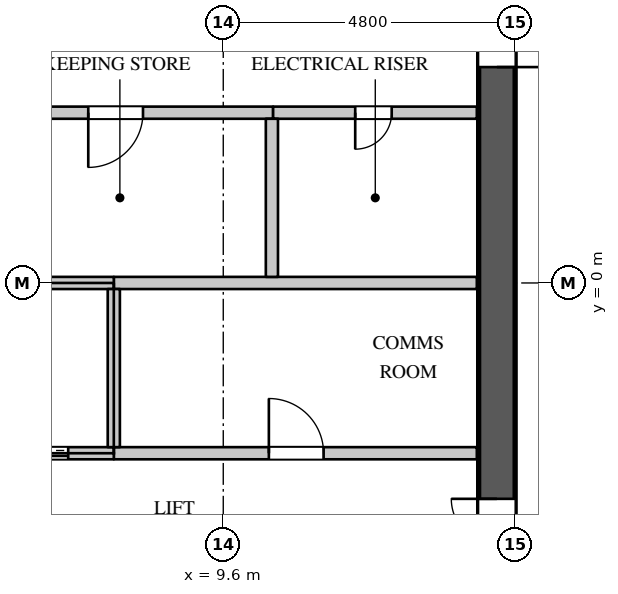
"""IFC4 building model, lengths in metres.
Left out: names, types, materials, properties, quantities, classifications, styles, units other than length and angle.
Written with IfcOpenShell. Run it as: python <this file> out.ifc"""

import sys

from ifc_helpers import new_model, si_unit, direction, frame, frame_2d, origin, place, context, subcontext, project, spatial, rectangle, extrude, element, fill, save


model = new_model("IFC4")
c1 = context("Model", 3, precision=1e-05, world=origin(), true_north=direction((0.0, 1.0)))
c2 = subcontext(c1, "Body", "Model", "MODEL_VIEW")
j1 = project(units=[si_unit("LENGTHUNIT", "METRE"), si_unit("PLANEANGLEUNIT", "RADIAN")], contexts=[c1])
p1 = place(None, origin())
s1 = spatial("IfcSite", under=j1, at=p1, CompositionType="ELEMENT")
p2 = place(p1, origin())
s2 = spatial("IfcBuilding", under=s1, at=p2, CompositionType="ELEMENT")
p3 = place(p2, frame((0.0, 0.0, 218.1)))
s3 = spatial("IfcBuildingStorey", under=s2, at=p3, CompositionType="ELEMENT", Elevation=218.1)
p4 = place(p3, frame((14.1, -11.4, 0.0), z_axis=(0.0, 0.0, 1.0), x_axis=(0.0, 1.0, 0.0)))
e1 = element("IfcWall", 1, at=p4, inside=s3, PredefinedType="SHEAR", context=c2, shape_type="SweptSolid", body=[
    extrude(rectangle(XDim=22.8, YDim=0.6, at=frame_2d((11.4, 0.0))), origin(), (0.0, 0.0, 1.0), 4.2),
])
p5 = place(p4, frame((20.45, 0.0, 0.0)))
e2 = element("IfcOpeningElement", 2, at=p5, cuts=e1, PredefinedType="OPENING", context=c2, shape_type="SweptSolid", body=[
    extrude(rectangle(XDim=1.1, YDim=2.2, at=frame_2d((0.55, 1.1))), frame((0.0, 0.31, 0.0), z_axis=(0.0, -1.0, 0.0), x_axis=(1.0, 0.0, 0.0)), (0.0, 0.0, 1.0), 0.62),
])
p6 = place(p4, frame((1.25, 0.0, 0.0)))
e3 = element("IfcOpeningElement", 3, at=p6, cuts=e1, PredefinedType="OPENING", context=c2, shape_type="SweptSolid", body=[
    extrude(rectangle(XDim=1.1, YDim=2.2, at=frame_2d((0.55, 1.1))), frame((0.0, 0.31, 0.0), z_axis=(0.0, -1.0, 0.0), x_axis=(1.0, 0.0, 0.0)), (0.0, 0.0, 1.0), 0.62),
])
p7 = place(p4, frame((14.95, 0.0, 0.0)))
e4 = element("IfcOpeningElement", 4, at=p7, cuts=e1, PredefinedType="OPENING", context=c2, shape_type="SweptSolid", body=[
    extrude(rectangle(XDim=1.5, YDim=2.4, at=frame_2d((0.75, 1.2))), frame((0.0, 0.31, 0.0), z_axis=(0.0, -1.0, 0.0), x_axis=(1.0, 0.0, 0.0)), (0.0, 0.0, 1.0), 0.62),
])
p8 = place(p4, frame((6.35, 0.0, 0.0)))
e5 = element("IfcOpeningElement", 5, at=p8, cuts=e1, PredefinedType="OPENING", context=c2, shape_type="SweptSolid", body=[
    extrude(rectangle(XDim=1.5, YDim=2.4, at=frame_2d((0.75, 1.2))), frame((0.0, 0.31, 0.0), z_axis=(0.0, -1.0, 0.0), x_axis=(1.0, 0.0, 0.0)), (0.0, 0.0, 1.0), 0.62),
])
p9 = place(p3, frame((1.38, 2.8, 0.0), z_axis=(0.0, 0.0, 1.0), x_axis=(1.0, 0.0, 0.0)))
e6 = element("IfcWall", 6, at=p9, inside=s3, PredefinedType="PARTITIONING", context=c2, shape_type="SweptSolid", body=[
    extrude(rectangle(XDim=9.04, YDim=0.2, at=frame_2d((4.52, 0.0))), origin(), (0.0, 0.0, 1.0), 3.95),
])
p10 = place(p9, frame((1.6, 0.0, 0.0)))
e7 = element("IfcOpeningElement", 7, at=p10, cuts=e6, PredefinedType="OPENING", context=c2, shape_type="SweptSolid", body=[
    extrude(rectangle(XDim=0.9, YDim=2.2, at=frame_2d((0.45, 1.1))), frame((0.0, 0.11, 0.0), z_axis=(0.0, -1.0, 0.0), x_axis=(1.0, 0.0, 0.0)), (0.0, 0.0, 1.0), 0.22),
])
p11 = place(p9, frame((6.0, 0.0, 0.0)))
e8 = element("IfcOpeningElement", 8, at=p11, cuts=e6, PredefinedType="OPENING", context=c2, shape_type="SweptSolid", body=[
    extrude(rectangle(XDim=0.9, YDim=2.2, at=frame_2d((0.45, 1.1))), frame((0.0, 0.11, 0.0), z_axis=(0.0, -1.0, 0.0), x_axis=(1.0, 0.0, 0.0)), (0.0, 0.0, 1.0), 0.22),
])
p12 = place(p3, frame((7.8, -2.8, 0.0), z_axis=(0.0, 0.0, 1.0), x_axis=(1.0, 0.0, 0.0)))
e9 = element("IfcWall", 9, at=p12, inside=s3, PredefinedType="PARTITIONING", context=c2, shape_type="SweptSolid", body=[
    extrude(rectangle(XDim=5.97, YDim=0.2, at=frame_2d((2.985, 0.0))), origin(), (0.0, 0.0, 1.0), 3.95),
])
p13 = place(p12, frame((2.55, 0.0, 0.0)))
e10 = element("IfcOpeningElement", 10, at=p13, cuts=e9, PredefinedType="OPENING", context=c2, shape_type="SweptSolid", body=[
    extrude(rectangle(XDim=0.9, YDim=2.2, at=frame_2d((0.45, 1.1))), frame((0.0, 0.11, 0.0), z_axis=(0.0, -1.0, 0.0), x_axis=(1.0, 0.0, 0.0)), (0.0, 0.0, 1.0), 0.22),
])
p14 = place(p3, frame((7.8, 0.0, 0.0), z_axis=(0.0, 0.0, 1.0), x_axis=(1.0, 0.0, 0.0)))
e11 = element("IfcWall", 11, at=p14, inside=s3, PredefinedType="PARTITIONING", context=c2, shape_type="SweptSolid", body=[
    extrude(rectangle(XDim=5.97, YDim=0.2, at=frame_2d((2.985, 0.0))), origin(), (0.0, 0.0, 1.0), 3.95),
])
p15 = place(p3, frame((10.42, 2.8, 0.0), z_axis=(0.0, 0.0, 1.0), x_axis=(1.0, 0.0, 0.0)))
e12 = element("IfcWall", 12, at=p15, inside=s3, PredefinedType="PARTITIONING", context=c2, shape_type="SweptSolid", body=[
    extrude(rectangle(XDim=3.35, YDim=0.2, at=frame_2d((1.675, 0.0))), origin(), (0.0, 0.0, 1.0), 3.95),
])
p16 = place(p15, frame((1.35, 0.0, 0.0)))
e13 = element("IfcOpeningElement", 13, at=p16, cuts=e12, PredefinedType="OPENING", context=c2, shape_type="SweptSolid", body=[
    extrude(rectangle(XDim=0.6, YDim=2.0, at=frame_2d((0.3, 1.0))), frame((0.0, 0.11, 0.0), z_axis=(0.0, -1.0, 0.0), x_axis=(1.0, 0.0, 0.0)), (0.0, 0.0, 1.0), 0.22),
])
p17 = place(p3, frame((10.4, 0.1, 0.0), z_axis=(0.0, 0.0, 1.0), x_axis=(0.0, 1.0, 0.0)))
e14 = element("IfcWall", 14, at=p17, inside=s3, PredefinedType="PARTITIONING", context=c2, shape_type="SweptSolid", body=[
    extrude(rectangle(XDim=2.6, YDim=0.2, at=frame_2d((1.3, 0.0))), origin(), (0.0, 0.0, 1.0), 3.95),
])
p18 = place(p3, frame((-13.77, 0.0, 0.0), z_axis=(0.0, 0.0, 1.0), x_axis=(1.0, 0.0, 0.0)))
e15 = element("IfcWall", 15, at=p18, inside=s3, PredefinedType="PARTITIONING", context=c2, shape_type="SweptSolid", body=[
    extrude(rectangle(XDim=21.57, YDim=0.2, at=frame_2d((10.785, 0.0))), origin(), (0.0, 0.0, 1.0), 3.95),
])
p19 = place(p3, frame((-10.4, -2.8, 0.0), z_axis=(0.0, 0.0, 1.0), x_axis=(1.0, 0.0, 0.0)))
e16 = element("IfcWall", 16, at=p19, inside=s3, PredefinedType="PARTITIONING", context=c2, shape_type="SweptSolid", body=[
    extrude(rectangle(XDim=18.2, YDim=0.2, at=frame_2d((9.1, 0.0))), origin(), (0.0, 0.0, 1.0), 3.95),
])
p20 = place(p19, frame((0.75, 0.0, 0.0)))
e17 = element("IfcOpeningElement", 17, at=p20, cuts=e16, PredefinedType="OPENING", context=c2, shape_type="SweptSolid", body=[
    extrude(rectangle(XDim=1.1, YDim=2.2, at=frame_2d((0.55, 1.1))), frame((0.0, 0.11, 0.0), z_axis=(0.0, -1.0, 0.0), x_axis=(1.0, 0.0, 0.0)), (0.0, 0.0, 1.0), 0.22),
])
p21 = place(p19, frame((3.35, 0.0, 0.0)))
e18 = element("IfcOpeningElement", 18, at=p21, cuts=e16, PredefinedType="OPENING", context=c2, shape_type="SweptSolid", body=[
    extrude(rectangle(XDim=1.1, YDim=2.2, at=frame_2d((0.55, 1.1))), frame((0.0, 0.11, 0.0), z_axis=(0.0, -1.0, 0.0), x_axis=(1.0, 0.0, 0.0)), (0.0, 0.0, 1.0), 0.22),
])
p22 = place(p19, frame((5.95, 0.0, 0.0)))
e19 = element("IfcOpeningElement", 19, at=p22, cuts=e16, PredefinedType="OPENING", context=c2, shape_type="SweptSolid", body=[
    extrude(rectangle(XDim=1.1, YDim=2.2, at=frame_2d((0.55, 1.1))), frame((0.0, 0.11, 0.0), z_axis=(0.0, -1.0, 0.0), x_axis=(1.0, 0.0, 0.0)), (0.0, 0.0, 1.0), 0.22),
])
p23 = place(p19, frame((8.55, 0.0, 0.0)))
e20 = element("IfcOpeningElement", 20, at=p23, cuts=e16, PredefinedType="OPENING", context=c2, shape_type="SweptSolid", body=[
    extrude(rectangle(XDim=1.1, YDim=2.2, at=frame_2d((0.55, 1.1))), frame((0.0, 0.11, 0.0), z_axis=(0.0, -1.0, 0.0), x_axis=(1.0, 0.0, 0.0)), (0.0, 0.0, 1.0), 0.22),
])
p24 = place(p19, frame((11.15, 0.0, 0.0)))
e21 = element("IfcOpeningElement", 21, at=p24, cuts=e16, PredefinedType="OPENING", context=c2, shape_type="SweptSolid", body=[
    extrude(rectangle(XDim=1.1, YDim=2.2, at=frame_2d((0.55, 1.1))), frame((0.0, 0.11, 0.0), z_axis=(0.0, -1.0, 0.0), x_axis=(1.0, 0.0, 0.0)), (0.0, 0.0, 1.0), 0.22),
])
p25 = place(p19, frame((13.75, 0.0, 0.0)))
e22 = element("IfcOpeningElement", 22, at=p25, cuts=e16, PredefinedType="OPENING", context=c2, shape_type="SweptSolid", body=[
    extrude(rectangle(XDim=1.1, YDim=2.2, at=frame_2d((0.55, 1.1))), frame((0.0, 0.11, 0.0), z_axis=(0.0, -1.0, 0.0), x_axis=(1.0, 0.0, 0.0)), (0.0, 0.0, 1.0), 0.22),
])
p26 = place(p19, frame((16.35, 0.0, 0.0)))
e23 = element("IfcOpeningElement", 23, at=p26, cuts=e16, PredefinedType="OPENING", context=c2, shape_type="SweptSolid", body=[
    extrude(rectangle(XDim=1.1, YDim=2.2, at=frame_2d((0.55, 1.1))), frame((0.0, 0.11, 0.0), z_axis=(0.0, -1.0, 0.0), x_axis=(1.0, 0.0, 0.0)), (0.0, 0.0, 1.0), 0.22),
])
p27 = place(p3, frame((7.8, -2.7, 0.0), z_axis=(0.0, 0.0, 1.0), x_axis=(0.0, 1.0, 0.0)))
e24 = element("IfcWall", 24, at=p27, inside=s3, PredefinedType="PARTITIONING", context=c2, shape_type="SweptSolid", body=[
    extrude(rectangle(XDim=2.6, YDim=0.2, at=frame_2d((1.3, 0.0))), origin(), (0.0, 0.0, 1.0), 3.95),
])
p28 = place(p16, origin())
e25 = element("IfcDoor", 25, at=p28, inside=s3, OperationType="SINGLE_SWING_RIGHT", PredefinedType="DOOR", context=c2, shape_type="SweptSolid", body=[
    extrude(rectangle(XDim=0.6, YDim=2.0, at=frame_2d((0.3, 1.0))), frame((0.0, 0.025, 0.0), z_axis=(0.0, -1.0, 0.0), x_axis=(1.0, 0.0, 0.0)), (0.0, 0.0, 1.0), 0.05),
])
fill(e13, e25)
p29 = place(p13, origin())
e26 = element("IfcDoor", 26, at=p29, inside=s3, OperationType="SINGLE_SWING_LEFT", PredefinedType="DOOR", context=c2, shape_type="SweptSolid", body=[
    extrude(rectangle(XDim=0.9, YDim=2.2, at=frame_2d((0.45, 1.1))), frame((0.0, 0.025, 0.0), z_axis=(0.0, -1.0, 0.0), x_axis=(1.0, 0.0, 0.0)), (0.0, 0.0, 1.0), 0.05),
])
fill(e10, e26)
p30 = place(p11, origin())
e27 = element("IfcDoor", 27, at=p30, inside=s3, OperationType="SINGLE_SWING_RIGHT", PredefinedType="DOOR", context=c2, shape_type="SweptSolid", body=[
    extrude(rectangle(XDim=0.9, YDim=2.2, at=frame_2d((0.45, 1.1))), frame((0.0, 0.025, 0.0), z_axis=(0.0, -1.0, 0.0), x_axis=(1.0, 0.0, 0.0)), (0.0, 0.0, 1.0), 0.05),
])
fill(e8, e27)
p31 = place(p26, origin())
e28 = element("IfcDoor", 28, at=p31, inside=s3, OperationType="DOUBLE_DOOR_SLIDING", PredefinedType="DOOR", context=c2, shape_type="SweptSolid", body=[
    extrude(rectangle(XDim=1.1, YDim=2.2, at=frame_2d((0.55, 1.1))), frame((0.0, 0.025, 0.0), z_axis=(0.0, -1.0, 0.0), x_axis=(1.0, 0.0, 0.0)), (0.0, 0.0, 1.0), 0.05),
])
fill(e23, e28)
p32 = place(p7, origin())
e29 = element("IfcDoor", 29, at=p32, inside=s3, OperationType="DOUBLE_DOOR_SINGLE_SWING", PredefinedType="DOOR", context=c2, shape_type="SweptSolid", body=[
    extrude(rectangle(XDim=1.5, YDim=2.4, at=frame_2d((0.75, 1.2))), frame((0.0, -0.245, 0.0), z_axis=(0.0, -1.0, 0.0), x_axis=(1.0, 0.0, 0.0)), (0.0, 0.0, 1.0), 0.05),
])
fill(e4, e29)
p33 = place(p8, origin())
e30 = element("IfcDoor", 30, at=p33, inside=s3, OperationType="DOUBLE_DOOR_SINGLE_SWING", PredefinedType="DOOR", context=c2, shape_type="SweptSolid", body=[
    extrude(rectangle(XDim=1.5, YDim=2.4, at=frame_2d((0.75, 1.2))), frame((0.0, 0.295, 0.0), z_axis=(0.0, -1.0, 0.0), x_axis=(1.0, 0.0, 0.0)), (0.0, 0.0, 1.0), 0.05),
])
fill(e5, e30)
save(model, sys.argv[1])
